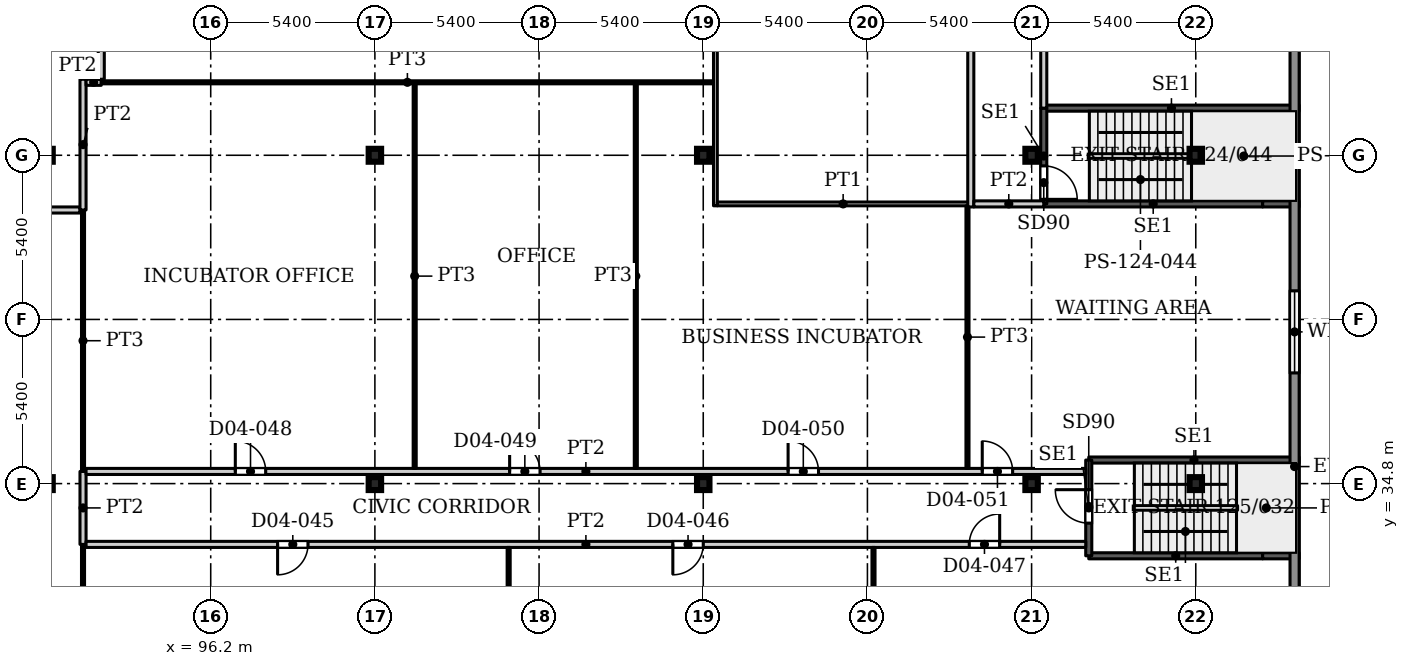
"""IFC4 building model, lengths in metres.
Left out: names, types, materials, properties, quantities, classifications, styles, units other than length and angle.
Written with IfcOpenShell. Run it as: python <this file> out.ifc"""

import sys

from ifc_helpers import new_model, si_unit, direction, frame, frame_2d, origin, origin_2d, place, context, subcontext, project, spatial, rectangle, i_section, extrude, source, transform, mapped, element, fill, save


model = new_model("IFC4")
c1 = context("Model", 3, precision=1e-05, world=origin(), true_north=direction((0.0, 1.0)))
c2 = subcontext(c1, "Body", "Model", "MODEL_VIEW")
j1 = project(units=[si_unit("LENGTHUNIT", "METRE"), si_unit("PLANEANGLEUNIT", "RADIAN")], contexts=[c1])
p1 = place(None, origin())
s1 = spatial("IfcSite", under=j1, at=p1, CompositionType="ELEMENT")
p2 = place(p1, origin())
s2 = spatial("IfcBuilding", under=s1, at=p2, CompositionType="ELEMENT")
p3 = place(p2, frame((0.0, 0.0, 21.5)))
s3 = spatial("IfcBuildingStorey", under=s2, at=p3, CompositionType="ELEMENT", Elevation=21.5)
for number, where, z_axis, x_axis in (
    (1, (90.8, 34.8, 0.0), (0.0, 0.0, 1.0), (1.0, 0.0, 0.0)),
    (2, (101.6, 34.8, 0.0), (0.0, 0.0, 1.0), (1.0, 0.0, 0.0)),
    (3, (112.4, 34.8, 0.0), (0.0, 0.0, 1.0), (1.0, 0.0, 0.0)),
    (4, (123.2, 34.8, 0.0), (0.0, 0.0, 1.0), (1.0, 0.0, 0.0)),
    (5, (128.6, 34.8, 0.0), (0.0, 0.0, 1.0), (1.0, 0.0, 0.0)),
    (6, (90.8, 45.6, 0.0), (0.0, 0.0, 1.0), (1.0, 0.0, 0.0)),
    (7, (101.6, 45.6, 0.0), (0.0, 0.0, 1.0), (1.0, 0.0, 0.0)),
    (8, (112.4, 45.6, 0.0), (0.0, 0.0, 1.0), (1.0, 0.0, 0.0)),
    (9, (123.2, 45.6, 0.0), (0.0, 0.0, 1.0), (1.0, 0.0, 0.0)),
    (10, (128.6, 45.6, 0.0), (0.0, 0.0, 1.0), (1.0, 0.0, 0.0)),
):
    element("IfcColumn", number, at=place(p3, frame(where, z_axis=z_axis, x_axis=x_axis)), inside=s3, PredefinedType="COLUMN", context=c2, shape_type="SweptSolid", body=[
        extrude(i_section(OverallWidth=0.409, OverallDepth=0.425, WebThickness=0.033, FlangeThickness=0.052, FilletRadius=0.013, at=origin_2d()), origin(), (0.0, 0.0, 1.0), 4.5),
    ])
p4 = place(p3, frame((131.85, 54.72, 0.0), z_axis=(0.0, 0.0, 1.0), x_axis=(0.0, -1.0, 0.0)))
e11 = element("IfcWall", 11, at=p4, inside=s3, PredefinedType="SOLIDWALL", context=c2, shape_type="SweptSolid", body=[
    extrude(rectangle(XDim=38.72, YDim=0.3, at=frame_2d((19.36, 0.0))), origin(), (0.0, 0.0, 1.0), 4.25),
])
p5 = place(p4, frame((2.435, 0.0, 0.9)))
e12 = element("IfcOpeningElement", 12, at=p5, cuts=e11, PredefinedType="OPENING", context=c2, shape_type="SweptSolid", body=[
    extrude(rectangle(XDim=2.7, YDim=2.1, at=frame_2d((1.35, 1.05))), frame((0.0, 0.16, 0.0), z_axis=(0.0, -1.0, 0.0), x_axis=(1.0, 0.0, 0.0)), (0.0, 0.0, 1.0), 0.32),
])
p6 = place(p4, frame((13.58, 0.0, 0.9)))
e13 = element("IfcOpeningElement", 13, at=p6, cuts=e11, PredefinedType="OPENING", context=c2, shape_type="SweptSolid", body=[
    extrude(rectangle(XDim=2.7, YDim=2.1, at=frame_2d((1.35, 1.05))), frame((0.0, 0.16, 0.0), z_axis=(0.0, -1.0, 0.0), x_axis=(1.0, 0.0, 0.0)), (0.0, 0.0, 1.0), 0.32),
])
p7 = place(p4, frame((26.16, 0.0, 0.9)))
e14 = element("IfcOpeningElement", 14, at=p7, cuts=e11, PredefinedType="OPENING", context=c2, shape_type="SweptSolid", body=[
    extrude(rectangle(XDim=2.7, YDim=2.1, at=frame_2d((1.35, 1.05))), frame((0.0, 0.16, 0.0), z_axis=(0.0, -1.0, 0.0), x_axis=(1.0, 0.0, 0.0)), (0.0, 0.0, 1.0), 0.32),
])
p8 = place(p3, frame((123.6, 44.0, 0.0), z_axis=(0.0, 0.0, 1.0), x_axis=(1.0, 0.0, 0.0)))
e15 = element("IfcWall", 15, at=p8, inside=s3, PredefinedType="SHEAR", context=c2, shape_type="SweptSolid", body=[
    extrude(rectangle(XDim=7.2, YDim=0.2, at=frame_2d((3.6, 0.0))), origin(), (0.0, 0.0, 1.0), 4.5),
])
p9 = place(p3, frame((130.8, 44.0, 0.0), z_axis=(0.0, 0.0, 1.0), x_axis=(1.0, 0.0, 0.0)))
e16 = element("IfcWall", 16, at=p9, inside=s3, PredefinedType="SHEAR", context=c2, shape_type="SweptSolid", body=[
    extrude(rectangle(XDim=1.2, YDim=0.2, at=frame_2d((0.6, 0.0))), origin(), (0.0, 0.0, 1.0), 4.5),
])
p10 = place(p3, frame((123.6, 47.15, 0.0), z_axis=(0.0, 0.0, 1.0), x_axis=(1.0, 0.0, 0.0)))
e17 = element("IfcWall", 17, at=p10, inside=s3, PredefinedType="SHEAR", context=c2, shape_type="SweptSolid", body=[
    extrude(rectangle(XDim=8.4, YDim=0.2, at=frame_2d((4.2, 0.0))), origin(), (0.0, 0.0, 1.0), 4.5),
])
p11 = place(p3, frame((123.6, 44.0, 0.0), z_axis=(0.0, 0.0, 1.0), x_axis=(0.0, 1.0, 0.0)))
e18 = element("IfcWall", 18, at=p11, inside=s3, PredefinedType="SHEAR", context=c2, shape_type="SweptSolid", body=[
    extrude(rectangle(XDim=3.15, YDim=0.2, at=frame_2d((1.575, 0.0))), origin(), (0.0, 0.0, 1.0), 4.5),
])
p12 = place(p11, frame((0.15, 0.0, 0.0)))
e19 = element("IfcOpeningElement", 19, at=p12, cuts=e18, PredefinedType="OPENING", context=c2, shape_type="SweptSolid", body=[
    extrude(rectangle(XDim=1.1, YDim=2.2, at=frame_2d((0.55, 1.1))), frame((0.0, 0.11, 0.0), z_axis=(0.0, -1.0, 0.0), x_axis=(1.0, 0.0, 0.0)), (0.0, 0.0, 1.0), 0.22),
])
p13 = place(p3, frame((125.08, 32.425, 0.0), z_axis=(0.0, 0.0, 1.0), x_axis=(1.0, 0.0, 0.0)))
e20 = element("IfcWall", 20, at=p13, inside=s3, PredefinedType="SHEAR", context=c2, shape_type="SweptSolid", body=[
    extrude(rectangle(XDim=5.72, YDim=0.2, at=frame_2d((2.86, 0.0))), origin(), (0.0, 0.0, 1.0), 4.5),
])
p14 = place(p3, frame((130.8, 32.425, 0.0), z_axis=(0.0, 0.0, 1.0), x_axis=(1.0, 0.0, 0.0)))
e21 = element("IfcWall", 21, at=p14, inside=s3, PredefinedType="SHEAR", context=c2, shape_type="SweptSolid", body=[
    extrude(rectangle(XDim=1.2, YDim=0.2, at=frame_2d((0.6, 0.0))), origin(), (0.0, 0.0, 1.0), 4.5),
])
p15 = place(p3, frame((125.08, 35.575, 0.0), z_axis=(0.0, 0.0, 1.0), x_axis=(1.0, 0.0, 0.0)))
e22 = element("IfcWall", 22, at=p15, inside=s3, PredefinedType="SHEAR", context=c2, shape_type="SweptSolid", body=[
    extrude(rectangle(XDim=6.92, YDim=0.2, at=frame_2d((3.46, 0.0))), origin(), (0.0, 0.0, 1.0), 4.5),
])
p16 = place(p3, frame((125.08, 32.425, 0.0), z_axis=(0.0, 0.0, 1.0), x_axis=(0.0, 1.0, 0.0)))
e23 = element("IfcWall", 23, at=p16, inside=s3, PredefinedType="SHEAR", context=c2, shape_type="SweptSolid", body=[
    extrude(rectangle(XDim=3.15, YDim=0.2, at=frame_2d((1.575, 0.0))), origin(), (0.0, 0.0, 1.0), 4.5),
])
p17 = place(p16, frame((1.075, 0.0, 0.0)))
e24 = element("IfcOpeningElement", 24, at=p17, cuts=e23, PredefinedType="OPENING", context=c2, shape_type="SweptSolid", body=[
    extrude(rectangle(XDim=1.1, YDim=2.2, at=frame_2d((0.55, 1.1))), frame((0.0, 0.11, 0.0), z_axis=(0.0, -1.0, 0.0), x_axis=(1.0, 0.0, 0.0)), (0.0, 0.0, 1.0), 0.22),
])
p18 = place(p3, frame((67.5, 43.8, 0.0), z_axis=(0.0, 0.0, 1.0), x_axis=(1.0, 0.0, 0.0)))
e25 = element("IfcWall", 25, at=p18, inside=s3, PredefinedType="PARTITIONING", context=c2, shape_type="SweptSolid", body=[
    extrude(rectangle(XDim=24.4, YDim=0.2, at=frame_2d((12.2, 0.0))), origin(), (0.0, 0.0, 1.0), 4.18),
])
p19 = place(p18, frame((11.3, 0.0, 0.0)))
e26 = element("IfcOpeningElement", 26, at=p19, cuts=e25, PredefinedType="OPENING", context=c2, shape_type="SweptSolid", body=[
    extrude(rectangle(XDim=1.8, YDim=2.1, at=frame_2d((0.9, 1.05))), frame((0.0, 0.11, 0.0), z_axis=(0.0, -1.0, 0.0), x_axis=(1.0, 0.0, 0.0)), (0.0, 0.0, 1.0), 0.22),
])
p20 = place(p3, frame((92.0, 22.05, 0.0), z_axis=(0.0, 0.0, 1.0), x_axis=(0.0, 1.0, 0.0)))
e27 = element("IfcWall", 27, at=p20, inside=s3, PredefinedType="PARTITIONING", context=c2, shape_type="SweptSolid", body=[
    extrude(rectangle(XDim=10.75, YDim=0.1, at=frame_2d((5.375, 0.0))), origin(), (0.0, 0.0, 1.0), 4.18),
])
p21 = place(p3, frame((92.0, 32.8, 0.0), z_axis=(0.0, 0.0, 1.0), x_axis=(0.0, 1.0, 0.0)))
e28 = element("IfcWall", 28, at=p21, inside=s3, PredefinedType="PARTITIONING", context=c2, shape_type="SweptSolid", body=[
    extrude(rectangle(XDim=2.4, YDim=0.2, at=frame_2d((1.2, 0.0))), origin(), (0.0, 0.0, 1.0), 4.18),
])
p22 = place(p3, frame((92.0, 35.2, 0.0), z_axis=(0.0, 0.0, 1.0), x_axis=(0.0, 1.0, 0.0)))
e29 = element("IfcWall", 29, at=p22, inside=s3, PredefinedType="PARTITIONING", context=c2, shape_type="SweptSolid", body=[
    extrude(rectangle(XDim=8.6, YDim=0.1, at=frame_2d((4.3, 0.0))), origin(), (0.0, 0.0, 1.0), 4.18),
])
p23 = place(p3, frame((92.0, 43.8, 0.0), z_axis=(0.0, 0.0, 1.0), x_axis=(0.0, 1.0, 0.0)))
e30 = element("IfcWall", 30, at=p23, inside=s3, PredefinedType="PARTITIONING", context=c2, shape_type="SweptSolid", body=[
    extrude(rectangle(XDim=4.3, YDim=0.2, at=frame_2d((2.15, 0.0))), origin(), (0.0, 0.0, 1.0), 4.18),
])
p24 = place(p3, frame((92.1, 32.8, 0.0), z_axis=(0.0, 0.0, 1.0), x_axis=(1.0, 0.0, 0.0)))
e31 = element("IfcWall", 31, at=p24, inside=s3, PredefinedType="PARTITIONING", context=c2, shape_type="SweptSolid", body=[
    extrude(rectangle(XDim=32.881, YDim=0.2, at=frame_2d((16.44, 0.0))), origin(), (0.0, 0.0, 1.0), 4.18),
])
p25 = place(p24, frame((6.3, 0.0, 0.0)))
e32 = element("IfcOpeningElement", 32, at=p25, cuts=e31, PredefinedType="OPENING", context=c2, shape_type="SweptSolid", body=[
    extrude(rectangle(XDim=1.0, YDim=2.1, at=frame_2d((0.5, 1.05))), frame((0.0, 0.11, 0.0), z_axis=(0.0, -1.0, 0.0), x_axis=(1.0, 0.0, 0.0)), (0.0, 0.0, 1.0), 0.22),
])
p26 = place(p24, frame((19.3, 0.0, 0.0)))
e33 = element("IfcOpeningElement", 33, at=p26, cuts=e31, PredefinedType="OPENING", context=c2, shape_type="SweptSolid", body=[
    extrude(rectangle(XDim=1.0, YDim=2.1, at=frame_2d((0.5, 1.05))), frame((0.0, 0.11, 0.0), z_axis=(0.0, -1.0, 0.0), x_axis=(1.0, 0.0, 0.0)), (0.0, 0.0, 1.0), 0.22),
])
p27 = place(p24, frame((29.05, 0.0, 0.0)))
e34 = element("IfcOpeningElement", 34, at=p27, cuts=e31, PredefinedType="OPENING", context=c2, shape_type="SweptSolid", body=[
    extrude(rectangle(XDim=1.0, YDim=2.1, at=frame_2d((0.5, 1.05))), frame((0.0, 0.11, 0.0), z_axis=(0.0, -1.0, 0.0), x_axis=(1.0, 0.0, 0.0)), (0.0, 0.0, 1.0), 0.22),
])
p28 = place(p3, frame((92.1, 35.2, 0.0), z_axis=(0.0, 0.0, 1.0), x_axis=(1.0, 0.0, 0.0)))
e35 = element("IfcWall", 35, at=p28, inside=s3, PredefinedType="PARTITIONING", context=c2, shape_type="SweptSolid", body=[
    extrude(rectangle(XDim=32.88, YDim=0.2, at=frame_2d((16.44, 0.0))), origin(), (0.0, 0.0, 1.0), 4.18),
])
p29 = place(p28, frame((4.909, 0.0, 0.0)))
e36 = element("IfcOpeningElement", 36, at=p29, cuts=e35, PredefinedType="OPENING", context=c2, shape_type="SweptSolid", body=[
    extrude(rectangle(XDim=1.0, YDim=2.1, at=frame_2d((0.5, 1.05))), frame((0.0, 0.11, 0.0), z_axis=(0.0, -1.0, 0.0), x_axis=(1.0, 0.0, 0.0)), (0.0, 0.0, 1.0), 0.22),
])
p30 = place(p28, frame((13.932, 0.0, 0.0)))
e37 = element("IfcOpeningElement", 37, at=p30, cuts=e35, PredefinedType="OPENING", context=c2, shape_type="SweptSolid", body=[
    extrude(rectangle(XDim=1.0, YDim=2.1, at=frame_2d((0.5, 1.05))), frame((0.0, 0.11, 0.0), z_axis=(0.0, -1.0, 0.0), x_axis=(1.0, 0.0, 0.0)), (0.0, 0.0, 1.0), 0.22),
])
p31 = place(p28, frame((23.091, 0.0, 0.0)))
e38 = element("IfcOpeningElement", 38, at=p31, cuts=e35, PredefinedType="OPENING", context=c2, shape_type="SweptSolid", body=[
    extrude(rectangle(XDim=1.0, YDim=2.1, at=frame_2d((0.5, 1.05))), frame((0.0, 0.11, 0.0), z_axis=(0.0, -1.0, 0.0), x_axis=(1.0, 0.0, 0.0)), (0.0, 0.0, 1.0), 0.22),
])
p32 = place(p28, frame((29.477, 0.0, 0.0)))
e39 = element("IfcOpeningElement", 39, at=p32, cuts=e35, PredefinedType="OPENING", context=c2, shape_type="SweptSolid", body=[
    extrude(rectangle(XDim=1.0, YDim=2.1, at=frame_2d((0.5, 1.05))), frame((0.0, 0.11, 0.0), z_axis=(0.0, -1.0, 0.0), x_axis=(1.0, 0.0, 0.0)), (0.0, 0.0, 1.0), 0.22),
])
p33 = place(p3, frame((92.1, 48.0, 0.0), z_axis=(0.0, 0.0, 1.0), x_axis=(1.0, 0.0, 0.0)))
e40 = element("IfcWall", 40, at=p33, inside=s3, PredefinedType="PARTITIONING", context=c2, shape_type="SweptSolid", body=[
    extrude(rectangle(XDim=0.5, YDim=0.2, at=frame_2d((0.25, 0.0))), origin(), (0.0, 0.0, 1.0), 4.18),
])
p34 = place(p3, frame((92.6, 48.0, 0.0), z_axis=(0.0, 0.0, 1.0), x_axis=(1.0, 0.0, 0.0)))
e41 = element("IfcWall", 41, at=p34, inside=s3, PredefinedType="PARTITIONING", context=c2, shape_type="SweptSolid", body=[
    extrude(rectangle(XDim=20.138, YDim=0.1, at=frame_2d((10.069, 0.0))), origin(), (0.0, 0.0, 1.0), 4.18),
])
p35 = place(p3, frame((92.6, 48.1, 0.0), z_axis=(0.0, 0.0, 1.0), x_axis=(0.0, 1.0, 0.0)))
e42 = element("IfcWall", 42, at=p35, inside=s3, PredefinedType="PARTITIONING", context=c2, shape_type="SweptSolid", body=[
    extrude(rectangle(XDim=20.9, YDim=0.2, at=frame_2d((10.45, 0.0))), origin(), (0.0, 0.0, 1.0), 4.18),
])
p36 = place(p35, frame((8.05, 0.0, 0.0)))
e43 = element("IfcOpeningElement", 43, at=p36, cuts=e42, PredefinedType="OPENING", context=c2, shape_type="SweptSolid", body=[
    extrude(rectangle(XDim=1.8, YDim=2.1, at=frame_2d((0.9, 1.05))), frame((0.0, 0.11, 0.0), z_axis=(0.0, -1.0, 0.0), x_axis=(1.0, 0.0, 0.0)), (0.0, 0.0, 1.0), 0.22),
])
p37 = place(p35, frame((18.8, 0.0, 0.0)))
e44 = element("IfcOpeningElement", 44, at=p37, cuts=e42, PredefinedType="OPENING", context=c2, shape_type="SweptSolid", body=[
    extrude(rectangle(XDim=1.0, YDim=2.1, at=frame_2d((0.5, 1.05))), frame((0.0, 0.11, 0.0), z_axis=(0.0, -1.0, 0.0), x_axis=(1.0, 0.0, 0.0)), (0.0, 0.0, 1.0), 0.22),
])
p38 = place(p3, frame((102.909, 35.3, 0.0), z_axis=(0.0, 0.0, 1.0), x_axis=(0.0, 1.0, 0.0)))
e45 = element("IfcWall", 45, at=p38, inside=s3, PredefinedType="PARTITIONING", context=c2, shape_type="SweptSolid", body=[
    extrude(rectangle(XDim=12.65, YDim=0.1, at=frame_2d((6.325, 0.0))), origin(), (0.0, 0.0, 1.0), 4.18),
])
p39 = place(p3, frame((106.0, 22.05, 0.0), z_axis=(0.0, 0.0, 1.0), x_axis=(0.0, 1.0, 0.0)))
e46 = element("IfcWall", 46, at=p39, inside=s3, PredefinedType="PARTITIONING", context=c2, shape_type="SweptSolid", body=[
    extrude(rectangle(XDim=10.65, YDim=0.1, at=frame_2d((5.325, 0.0))), origin(), (0.0, 0.0, 1.0), 4.18),
])
p40 = place(p3, frame((110.182, 35.3, 0.0), z_axis=(0.0, 0.0, 1.0), x_axis=(0.0, 1.0, 0.0)))
e47 = element("IfcWall", 47, at=p40, inside=s3, PredefinedType="PARTITIONING", context=c2, shape_type="SweptSolid", body=[
    extrude(rectangle(XDim=12.65, YDim=0.1, at=frame_2d((6.325, 0.0))), origin(), (0.0, 0.0, 1.0), 4.18),
])
p41 = place(p3, frame((112.8, 43.938, 0.0), z_axis=(0.0, 0.0, 1.0), x_axis=(0.0, 1.0, 0.0)))
e48 = element("IfcWall", 48, at=p41, inside=s3, PredefinedType="PARTITIONING", context=c2, shape_type="SweptSolid", body=[
    extrude(rectangle(XDim=46.787, YDim=0.125, at=frame_2d((23.394, 0.0))), origin(), (0.0, 0.0, 1.0), 4.18),
])
p42 = place(p3, frame((112.862, 44.0, 0.0), z_axis=(0.0, 0.0, 1.0), x_axis=(1.0, 0.0, 0.0)))
e49 = element("IfcWall", 49, at=p42, inside=s3, PredefinedType="PARTITIONING", context=c2, shape_type="SweptSolid", body=[
    extrude(rectangle(XDim=8.279, YDim=0.125, at=frame_2d((4.14, 0.0))), origin(), (0.0, 0.0, 1.0), 4.18),
])
p43 = place(p3, frame((118.0, 22.05, 0.0), z_axis=(0.0, 0.0, 1.0), x_axis=(0.0, 1.0, 0.0)))
e50 = element("IfcWall", 50, at=p43, inside=s3, PredefinedType="PARTITIONING", context=c2, shape_type="SweptSolid", body=[
    extrude(rectangle(XDim=10.65, YDim=0.1, at=frame_2d((5.325, 0.0))), origin(), (0.0, 0.0, 1.0), 4.18),
])
p44 = place(p3, frame((121.091, 35.3, 0.0), z_axis=(0.0, 0.0, 1.0), x_axis=(0.0, 1.0, 0.0)))
e51 = element("IfcWall", 51, at=p44, inside=s3, PredefinedType="PARTITIONING", context=c2, shape_type="SweptSolid", body=[
    extrude(rectangle(XDim=8.638, YDim=0.1, at=frame_2d((4.319, 0.0))), origin(), (0.0, 0.0, 1.0), 4.18),
])
p45 = place(p3, frame((121.2, 43.9, 0.0), z_axis=(0.0, 0.0, 1.0), x_axis=(0.0, 1.0, 0.0)))
e52 = element("IfcWall", 52, at=p45, inside=s3, PredefinedType="PARTITIONING", context=c2, shape_type="SweptSolid", body=[
    extrude(rectangle(XDim=22.6, YDim=0.2, at=frame_2d((11.3, 0.0))), origin(), (0.0, 0.0, 1.0), 4.18),
])
p46 = place(p45, frame((6.112, 0.0, 0.0)))
e53 = element("IfcOpeningElement", 53, at=p46, cuts=e52, PredefinedType="OPENING", context=c2, shape_type="SweptSolid", body=[
    extrude(rectangle(XDim=1.0, YDim=2.1, at=frame_2d((0.5, 1.05))), frame((0.0, 0.11, 0.0), z_axis=(0.0, -1.0, 0.0), x_axis=(1.0, 0.0, 0.0)), (0.0, 0.0, 1.0), 0.22),
])
p47 = place(p45, frame((17.45, 0.0, 0.0)))
e54 = element("IfcOpeningElement", 54, at=p47, cuts=e52, PredefinedType="OPENING", context=c2, shape_type="SweptSolid", body=[
    extrude(rectangle(XDim=1.0, YDim=2.1, at=frame_2d((0.5, 1.05))), frame((0.0, 0.11, 0.0), z_axis=(0.0, -1.0, 0.0), x_axis=(1.0, 0.0, 0.0)), (0.0, 0.0, 1.0), 0.22),
])
p48 = place(p3, frame((121.3, 44.0, 0.0), z_axis=(0.0, 0.0, 1.0), x_axis=(1.0, 0.0, 0.0)))
e55 = element("IfcWall", 55, at=p48, inside=s3, PredefinedType="PARTITIONING", context=c2, shape_type="SweptSolid", body=[
    extrude(rectangle(XDim=2.3, YDim=0.2, at=frame_2d((1.15, 0.0))), origin(), (0.0, 0.0, 1.0), 4.18),
])
p49 = place(p3, frame((123.6, 47.15, 0.0), z_axis=(0.0, 0.0, 1.0), x_axis=(0.0, 1.0, 0.0)))
e56 = element("IfcWall", 56, at=p49, inside=s3, PredefinedType="PARTITIONING", context=c2, shape_type="SweptSolid", body=[
    extrude(rectangle(XDim=18.85, YDim=0.2, at=frame_2d((9.425, 0.0))), origin(), (0.0, 0.0, 1.0), 4.18),
])
p50 = place(p49, frame((6.65, 0.0, 0.0)))
e57 = element("IfcOpeningElement", 57, at=p50, cuts=e56, PredefinedType="OPENING", context=c2, shape_type="SweptSolid", body=[
    extrude(rectangle(XDim=1.0, YDim=2.1, at=frame_2d((0.5, 1.05))), frame((0.0, 0.11, 0.0), z_axis=(0.0, -1.0, 0.0), x_axis=(1.0, 0.0, 0.0)), (0.0, 0.0, 1.0), 0.22),
])
p51 = place(p49, frame((16.119, 0.0, 0.0)))
e58 = element("IfcOpeningElement", 58, at=p51, cuts=e56, PredefinedType="OPENING", context=c2, shape_type="SweptSolid", body=[
    extrude(rectangle(XDim=1.0, YDim=2.1, at=frame_2d((0.5, 1.05))), frame((0.0, 0.11, 0.0), z_axis=(0.0, -1.0, 0.0), x_axis=(1.0, 0.0, 0.0)), (0.0, 0.0, 1.0), 0.22),
])
m1 = source(origin(), c2, "Body", "SweptSolid", [
    extrude(rectangle(XDim=2.7, YDim=2.1, at=frame_2d((1.35, 1.05))), frame((0.0, 0.03, 0.0), z_axis=(0.0, -1.0, 0.0), x_axis=(1.0, 0.0, 0.0)), (0.0, 0.0, 1.0), 0.06),
])
p52 = place(p6, origin())
e59 = element("IfcWindow", 59, at=p52, inside=s3, PartitioningType="SINGLE_PANEL", PredefinedType="WINDOW", context=c2, shape_type="MappedRepresentation", body=[
    mapped(m1, transform((0.0, 0.0, 0.0), x_axis=(1.0, 0.0, 0.0), y_axis=(0.0, 1.0, 0.0), z_axis=(0.0, 0.0, 1.0), scale=1.0)),
])
fill(e13, e59)
m2 = source(origin(), c2, "Body", "SweptSolid", [
    extrude(rectangle(XDim=1.1, YDim=2.2, at=frame_2d((0.55, 1.1))), frame((0.0, 0.025, 0.0), z_axis=(0.0, -1.0, 0.0), x_axis=(1.0, 0.0, 0.0)), (0.0, 0.0, 1.0), 0.05),
])
p53 = place(p12, origin())
e60 = element("IfcDoor", 60, at=p53, inside=s3, OperationType="SINGLE_SWING_RIGHT", PredefinedType="DOOR", context=c2, shape_type="MappedRepresentation", body=[
    mapped(m2, transform((0.0, 0.0, 0.0), x_axis=(1.0, 0.0, 0.0), y_axis=(0.0, 1.0, 0.0), z_axis=(0.0, 0.0, 1.0), scale=1.0)),
])
fill(e19, e60)
p54 = place(p17, origin())
e61 = element("IfcDoor", 61, at=p54, inside=s3, OperationType="SINGLE_SWING_LEFT", PredefinedType="DOOR", context=c2, shape_type="MappedRepresentation", body=[
    mapped(m2, transform((0.0, 0.0, 0.0), x_axis=(1.0, 0.0, 0.0), y_axis=(0.0, 1.0, 0.0), z_axis=(0.0, 0.0, 1.0), scale=1.0)),
])
fill(e24, e61)
m3 = source(origin(), c2, "Body", "SweptSolid", [
    extrude(rectangle(XDim=1.0, YDim=2.1, at=frame_2d((0.5, 1.05))), frame((0.0, 0.025, 0.0), z_axis=(0.0, -1.0, 0.0), x_axis=(1.0, 0.0, 0.0)), (0.0, 0.0, 1.0), 0.05),
])
p55 = place(p25, origin())
e62 = element("IfcDoor", 62, at=p55, inside=s3, OperationType="SINGLE_SWING_RIGHT", PredefinedType="DOOR", context=c2, shape_type="MappedRepresentation", body=[
    mapped(m3, transform((0.0, 0.0, 0.0), x_axis=(1.0, 0.0, 0.0), y_axis=(0.0, 1.0, 0.0), z_axis=(0.0, 0.0, 1.0), scale=1.0)),
])
fill(e32, e62)
p56 = place(p26, origin())
e63 = element("IfcDoor", 63, at=p56, inside=s3, OperationType="SINGLE_SWING_RIGHT", PredefinedType="DOOR", context=c2, shape_type="MappedRepresentation", body=[
    mapped(m3, transform((0.0, 0.0, 0.0), x_axis=(1.0, 0.0, 0.0), y_axis=(0.0, 1.0, 0.0), z_axis=(0.0, 0.0, 1.0), scale=1.0)),
])
fill(e33, e63)
p57 = place(p27, origin())
e64 = element("IfcDoor", 64, at=p57, inside=s3, OperationType="SINGLE_SWING_LEFT", PredefinedType="DOOR", context=c2, shape_type="MappedRepresentation", body=[
    mapped(m3, transform((0.0, 0.0, 0.0), x_axis=(1.0, 0.0, 0.0), y_axis=(0.0, 1.0, 0.0), z_axis=(0.0, 0.0, 1.0), scale=1.0)),
])
fill(e34, e64)
p58 = place(p29, origin())
e65 = element("IfcDoor", 65, at=p58, inside=s3, OperationType="SINGLE_SWING_LEFT", PredefinedType="DOOR", context=c2, shape_type="MappedRepresentation", body=[
    mapped(m3, transform((0.0, 0.0, 0.0), x_axis=(1.0, 0.0, 0.0), y_axis=(0.0, 1.0, 0.0), z_axis=(0.0, 0.0, 1.0), scale=1.0)),
])
fill(e36, e65)
p59 = place(p30, origin())
e66 = element("IfcDoor", 66, at=p59, inside=s3, OperationType="SINGLE_SWING_LEFT", PredefinedType="DOOR", context=c2, shape_type="MappedRepresentation", body=[
    mapped(m3, transform((0.0, 0.0, 0.0), x_axis=(1.0, 0.0, 0.0), y_axis=(0.0, 1.0, 0.0), z_axis=(0.0, 0.0, 1.0), scale=1.0)),
])
fill(e37, e66)
p60 = place(p31, origin())
e67 = element("IfcDoor", 67, at=p60, inside=s3, OperationType="SINGLE_SWING_LEFT", PredefinedType="DOOR", context=c2, shape_type="MappedRepresentation", body=[
    mapped(m3, transform((0.0, 0.0, 0.0), x_axis=(1.0, 0.0, 0.0), y_axis=(0.0, 1.0, 0.0), z_axis=(0.0, 0.0, 1.0), scale=1.0)),
])
fill(e38, e67)
p61 = place(p32, origin())
e68 = element("IfcDoor", 68, at=p61, inside=s3, OperationType="SINGLE_SWING_LEFT", PredefinedType="DOOR", context=c2, shape_type="MappedRepresentation", body=[
    mapped(m3, transform((0.0, 0.0, 0.0), x_axis=(1.0, 0.0, 0.0), y_axis=(0.0, 1.0, 0.0), z_axis=(0.0, 0.0, 1.0), scale=1.0)),
])
fill(e39, e68)
save(model, sys.argv[1])
